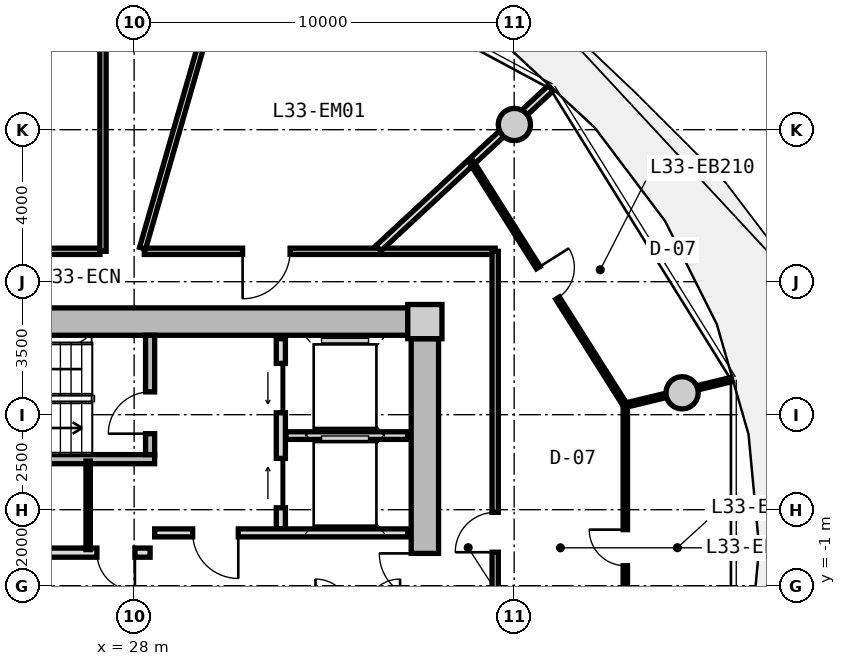
"""IFC4 building model, lengths in metres.
Left out: names, types, materials, properties, quantities, classifications, styles, units other than length and angle.
Written with IfcOpenShell. Run it as: python <this file> out.ifc"""

import sys

from ifc_helpers import new_model, si_unit, direction, frame, frame_2d, origin, origin_2d, place, context, subcontext, project, spatial, rectangle, circle, extrude, source, transform, mapped, element, fill, save


model = new_model("IFC4")
c1 = context("Model", 3, precision=1e-05, world=origin(), true_north=direction((0.0, 1.0)))
c2 = subcontext(c1, "Body", "Model", "MODEL_VIEW")
j1 = project(units=[si_unit("LENGTHUNIT", "METRE"), si_unit("PLANEANGLEUNIT", "RADIAN")], contexts=[c1])
p1 = place(None, origin())
s1 = spatial("IfcSite", under=j1, at=p1, CompositionType="ELEMENT")
p2 = place(p1, origin())
s2 = spatial("IfcBuilding", under=s1, at=p2, CompositionType="ELEMENT")
p3 = place(p2, frame((0.0, 0.0, 108.45)))
s3 = spatial("IfcBuildingStorey", under=s2, at=p3, CompositionType="ELEMENT", Elevation=108.45)
m1 = source(origin(), c2, "Body", "SweptSolid", [
    extrude(rectangle(XDim=0.9, YDim=0.9, at=origin_2d()), origin(), (0.0, 0.0, 1.0), 3.05),
])
p4 = place(p3, frame((35.65, 5.95, 0.0), z_axis=(0.0, 0.0, 1.0), x_axis=(1.0, 0.0, 0.0)))
e1 = element("IfcColumn", 1, at=p4, inside=s3, PredefinedType="COLUMN", context=c2, shape_type="MappedRepresentation", body=[
    mapped(m1, transform((0.0, 0.0, 0.0), x_axis=(1.0, 0.0, 0.0), y_axis=(0.0, 1.0, 0.0), z_axis=(0.0, 0.0, 1.0), scale=1.0)),
])
m2 = source(origin(), c2, "Body", "SweptSolid", [
    extrude(rectangle(XDim=14.4, YDim=0.72, at=frame_2d((7.2, 0.0))), origin(), (0.0, 0.0, 1.0), 2.79),
])
p5 = place(p3, frame((20.8, 5.95, 0.0), z_axis=(0.0, 0.0, 1.0), x_axis=(1.0, 0.0, 0.0)))
e2 = element("IfcWall", 2, at=p5, inside=s3, PredefinedType="SHEAR", context=c2, shape_type="MappedRepresentation", body=[
    mapped(m2, transform((0.0, 0.0, 0.0), x_axis=(1.0, 0.0, 0.0), y_axis=(0.0, 1.0, 0.0), z_axis=(0.0, 0.0, 1.0), scale=1.0)),
])
m3 = source(origin(), c2, "Body", "SweptSolid", [
    extrude(rectangle(XDim=11.0, YDim=0.72, at=frame_2d((5.5, 0.0))), origin(), (0.0, 0.0, 1.0), 2.79),
])
p6 = place(p3, frame((35.65, 5.5, 0.0), z_axis=(0.0, 0.0, 1.0), x_axis=(0.0, -1.0, 0.0)))
e3 = element("IfcWall", 3, at=p6, inside=s3, PredefinedType="SHEAR", context=c2, shape_type="MappedRepresentation", body=[
    mapped(m3, transform((0.0, 0.0, 0.0), x_axis=(1.0, 0.0, 0.0), y_axis=(0.0, 1.0, 0.0), z_axis=(0.0, 0.0, 1.0), scale=1.0)),
])
p7 = place(p6, frame((5.65, 0.0, 0.0)))
e4 = element("IfcOpeningElement", 4, at=p7, cuts=e3, PredefinedType="OPENING", context=c2, shape_type="SweptSolid", body=[
    extrude(rectangle(XDim=1.2, YDim=2.15, at=frame_2d((0.6, 1.075))), frame((0.0, 0.37, 0.0), z_axis=(0.0, -1.0, 0.0), x_axis=(1.0, 0.0, 0.0)), (0.0, 0.0, 1.0), 0.74),
])
m4 = source(origin(), c2, "Body", "SweptSolid", [
    extrude(circle(Radius=0.425, at=origin_2d()), origin(), (0.0, 0.0, 1.0), 3.05),
])
for number, where, z_axis, x_axis in (
    (5, (42.419, 4.076, 0.0), (0.0, 0.0, 1.0), (1.0, 0.0, 0.0)),
    (6, (38.006, 11.137, 0.0), (0.0, 0.0, 1.0), (1.0, 0.0, 0.0)),
):
    element("IfcColumn", number, at=place(p3, frame(where, z_axis=z_axis, x_axis=x_axis)), inside=s3, PredefinedType="COLUMN", context=c2, shape_type="MappedRepresentation", body=[
        mapped(m4, transform((0.0, 0.0, 0.0), x_axis=(1.0, 0.0, 0.0), y_axis=(0.0, 1.0, 0.0), z_axis=(0.0, 0.0, 1.0), scale=1.0)),
    ])
m5 = source(origin(), c2, "Body", "SweptSolid", [
    extrude(rectangle(XDim=7.83, YDim=0.24, at=frame_2d((3.915, 0.0))), origin(), (0.0, 0.0, 1.0), 2.79),
])
p8 = place(p3, frame((20.71, 2.33, 0.0), z_axis=(0.0, 0.0, 1.0), x_axis=(1.0, 0.0, 0.0)))
e7 = element("IfcWall", 7, at=p8, inside=s3, PredefinedType="PARTITIONING", context=c2, shape_type="MappedRepresentation", body=[
    mapped(m5, transform((0.0, 0.0, 0.0), x_axis=(1.0, 0.0, 0.0), y_axis=(0.0, 1.0, 0.0), z_axis=(0.0, 0.0, 1.0), scale=1.0)),
])
m6 = source(origin(), c2, "Body", "SweptSolid", [
    extrude(rectangle(XDim=3.14, YDim=0.24, at=frame_2d((1.57, 0.0))), origin(), (0.0, 0.0, 1.0), 2.79),
])
p9 = place(p3, frame((28.42, 2.45, 0.0), z_axis=(0.0, 0.0, 1.0), x_axis=(0.0, 1.0, 0.0)))
e8 = element("IfcWall", 8, at=p9, inside=s3, PredefinedType="PARTITIONING", context=c2, shape_type="MappedRepresentation", body=[
    mapped(m6, transform((0.0, 0.0, 0.0), x_axis=(1.0, 0.0, 0.0), y_axis=(0.0, 1.0, 0.0), z_axis=(0.0, 0.0, 1.0), scale=1.0)),
])
p10 = place(p9, frame((0.55, 0.0, 0.0)))
e9 = element("IfcOpeningElement", 9, at=p10, cuts=e8, PredefinedType="OPENING", context=c2, shape_type="SweptSolid", body=[
    extrude(rectangle(XDim=1.1, YDim=2.15, at=frame_2d((0.55, 1.075))), frame((0.0, 0.13, 0.0), z_axis=(0.0, -1.0, 0.0), x_axis=(1.0, 0.0, 0.0)), (0.0, 0.0, 1.0), 0.26),
])
m7 = source(origin(), c2, "Body", "SweptSolid", [
    extrude(rectangle(XDim=5.0, YDim=0.24, at=frame_2d((2.5, 0.0))), origin(), (0.0, 0.0, 1.0), 2.775),
])
p11 = place(p3, frame((31.86, 0.5, 0.0), z_axis=(0.0, 0.0, 1.0), x_axis=(0.0, 1.0, 0.0)))
e10 = element("IfcWall", 10, at=p11, inside=s3, PredefinedType="PARTITIONING", context=c2, shape_type="MappedRepresentation", body=[
    mapped(m7, transform((0.0, 0.0, 0.0), x_axis=(1.0, 0.0, 0.0), y_axis=(0.0, 1.0, 0.0), z_axis=(0.0, 0.0, 1.0), scale=1.0)),
])
p12 = place(p11, frame((3.05, 0.0, 0.0)))
e11 = element("IfcOpeningElement", 11, at=p12, cuts=e10, PredefinedType="OPENING", context=c2, shape_type="SweptSolid", body=[
    extrude(rectangle(XDim=1.3, YDim=2.2, at=frame_2d((0.65, 1.1))), frame((0.0, 0.13, 0.0), z_axis=(0.0, -1.0, 0.0), x_axis=(1.0, 0.0, 0.0)), (0.0, 0.0, 1.0), 0.26),
])
p13 = place(p11, frame((0.55, 0.0, 0.0)))
e12 = element("IfcOpeningElement", 12, at=p13, cuts=e10, PredefinedType="OPENING", context=c2, shape_type="SweptSolid", body=[
    extrude(rectangle(XDim=1.3, YDim=2.2, at=frame_2d((0.65, 1.1))), frame((0.0, 0.13, 0.0), z_axis=(0.0, -1.0, 0.0), x_axis=(1.0, 0.0, 0.0)), (0.0, 0.0, 1.0), 0.26),
])
m8 = source(origin(), c2, "Body", "SweptSolid", [
    extrude(rectangle(XDim=3.2, YDim=0.2, at=frame_2d((1.6, 0.0))), origin(), (0.0, 0.0, 1.0), 2.775),
])
p14 = place(p3, frame((32.0, 2.95, 0.0), z_axis=(0.0, 0.0, 1.0), x_axis=(1.0, 0.0, 0.0)))
e13 = element("IfcWall", 13, at=p14, inside=s3, PredefinedType="PARTITIONING", context=c2, shape_type="MappedRepresentation", body=[
    mapped(m8, transform((0.0, 0.0, 0.0), x_axis=(1.0, 0.0, 0.0), y_axis=(0.0, 1.0, 0.0), z_axis=(0.0, 0.0, 1.0), scale=1.0)),
])
m9 = source(origin(), c2, "Body", "SweptSolid", [
    extrude(rectangle(XDim=6.66, YDim=0.21, at=frame_2d((3.33, 0.0))), origin(), (0.0, 0.0, 1.0), 2.775),
])
p15 = place(p3, frame((28.54, 0.39, 0.0), z_axis=(0.0, 0.0, 1.0), x_axis=(1.0, 0.0, 0.0)))
e14 = element("IfcWall", 14, at=p15, inside=s3, PredefinedType="PARTITIONING", context=c2, shape_type="MappedRepresentation", body=[
    mapped(m9, transform((0.0, 0.0, 0.0), x_axis=(1.0, 0.0, 0.0), y_axis=(0.0, 1.0, 0.0), z_axis=(0.0, 0.0, 1.0), scale=1.0)),
])
p16 = place(p15, frame((1.0, 0.0, 0.0)))
e15 = element("IfcOpeningElement", 15, at=p16, cuts=e14, PredefinedType="OPENING", context=c2, shape_type="SweptSolid", body=[
    extrude(rectangle(XDim=1.2, YDim=2.15, at=frame_2d((0.6, 1.075))), frame((0.0, 0.115, 0.0), z_axis=(0.0, -1.0, 0.0), x_axis=(1.0, 0.0, 0.0)), (0.0, 0.0, 1.0), 0.23),
])
m10 = source(origin(), c2, "Body", "SweptSolid", [
    extrude(rectangle(XDim=7.62, YDim=0.24, at=frame_2d((3.81, 0.0))), origin(), (0.0, 0.0, 1.0), 2.775),
])
p17 = place(p3, frame((20.8, -0.13, 0.0), z_axis=(0.0, 0.0, 1.0), x_axis=(1.0, 0.0, 0.0)))
e16 = element("IfcWall", 16, at=p17, inside=s3, PredefinedType="PARTITIONING", context=c2, shape_type="MappedRepresentation", body=[
    mapped(m10, transform((0.0, 0.0, 0.0), x_axis=(1.0, 0.0, 0.0), y_axis=(0.0, 1.0, 0.0), z_axis=(0.0, 0.0, 1.0), scale=1.0)),
])
p18 = place(p17, frame((6.22, 0.0, 0.0)))
e17 = element("IfcOpeningElement", 17, at=p18, cuts=e16, PredefinedType="OPENING", context=c2, shape_type="SweptSolid", body=[
    extrude(rectangle(XDim=1.0, YDim=2.1, at=frame_2d((0.5, 1.05))), frame((0.0, 0.13, 0.0), z_axis=(0.0, -1.0, 0.0), x_axis=(1.0, 0.0, 0.0)), (0.0, 0.0, 1.0), 0.26),
])
p19 = place(p17, frame((2.4, 0.0, 0.0)))
e18 = element("IfcOpeningElement", 18, at=p19, cuts=e16, PredefinedType="OPENING", context=c2, shape_type="SweptSolid", body=[
    extrude(rectangle(XDim=1.0, YDim=2.1, at=frame_2d((0.5, 1.05))), frame((0.0, 0.13, 0.0), z_axis=(0.0, -1.0, 0.0), x_axis=(1.0, 0.0, 0.0)), (0.0, 0.0, 1.0), 0.26),
])
m11 = source(origin(), c2, "Body", "SweptSolid", [
    extrude(rectangle(XDim=2.33, YDim=0.115, at=frame_2d((1.165, 0.0))), origin(), (0.0, 0.0, 1.0), 2.775),
])
p20 = place(p3, frame((26.79, -0.05, 0.0), z_axis=(0.0, 0.0, 1.0), x_axis=(0.0, 1.0, 0.0)))
e19 = element("IfcWall", 19, at=p20, inside=s3, PredefinedType="PARTITIONING", context=c2, shape_type="MappedRepresentation", body=[
    mapped(m11, transform((0.0, 0.0, 0.0), x_axis=(1.0, 0.0, 0.0), y_axis=(0.0, 1.0, 0.0), z_axis=(0.0, 0.0, 1.0), scale=1.0)),
])
m12 = source(origin(), c2, "Body", "SweptSolid", [
    extrude(rectangle(XDim=8.6, YDim=0.165, at=frame_2d((4.3, 0.0))), origin(), (0.0, 0.0, 1.0), 2.775),
])
p21 = place(p3, frame((18.5, 7.8, 0.0), z_axis=(0.0, 0.0, 1.0), x_axis=(1.0, 0.0, 0.0)))
e20 = element("IfcWall", 20, at=p21, inside=s3, PredefinedType="PARTITIONING", context=c2, shape_type="MappedRepresentation", body=[
    mapped(m12, transform((0.0, 0.0, 0.0), x_axis=(1.0, 0.0, 0.0), y_axis=(0.0, 1.0, 0.0), z_axis=(0.0, 0.0, 1.0), scale=1.0)),
])
p22 = place(p21, frame((3.775, 0.0, 0.0)))
e21 = element("IfcOpeningElement", 21, at=p22, cuts=e20, PredefinedType="OPENING", context=c2, shape_type="SweptSolid", body=[
    extrude(rectangle(XDim=1.05, YDim=2.15, at=frame_2d((0.525, 1.075))), frame((0.0, 0.093, 0.0), z_axis=(0.0, -1.0, 0.0), x_axis=(1.0, 0.0, 0.0)), (0.0, 0.0, 1.0), 0.185),
])
m13 = source(origin(), c2, "Body", "SweptSolid", [
    extrude(rectangle(XDim=9.234, YDim=0.165, at=frame_2d((4.617, 0.0))), origin(), (0.0, 0.0, 1.0), 2.775),
])
p23 = place(p3, frame((28.266, 7.8, 0.0), z_axis=(0.0, 0.0, 1.0), x_axis=(1.0, 0.0, 0.0)))
e22 = element("IfcWall", 22, at=p23, inside=s3, PredefinedType="PARTITIONING", context=c2, shape_type="MappedRepresentation", body=[
    mapped(m13, transform((0.0, 0.0, 0.0), x_axis=(1.0, 0.0, 0.0), y_axis=(0.0, 1.0, 0.0), z_axis=(0.0, 0.0, 1.0), scale=1.0)),
])
p24 = place(p23, frame((2.588, 0.0, 0.0)))
e23 = element("IfcOpeningElement", 23, at=p24, cuts=e22, PredefinedType="OPENING", context=c2, shape_type="SweptSolid", body=[
    extrude(rectangle(XDim=1.25, YDim=2.2, at=frame_2d((0.625, 1.1))), frame((0.0, 0.093, 0.0), z_axis=(0.0, -1.0, 0.0), x_axis=(1.0, 0.0, 0.0)), (0.0, 0.0, 1.0), 0.185),
])
m14 = source(origin(), c2, "Body", "SweptSolid", [
    extrude(rectangle(XDim=15.6, YDim=0.165, at=frame_2d((7.8, 0.0))), origin(), (0.0, 0.0, 1.0), 2.775),
])
p25 = place(p3, frame((37.5, 7.8, 0.0), z_axis=(0.0, 0.0, 1.0), x_axis=(0.0, -1.0, 0.0)))
e24 = element("IfcWall", 24, at=p25, inside=s3, PredefinedType="PARTITIONING", context=c2, shape_type="MappedRepresentation", body=[
    mapped(m14, transform((0.0, 0.0, 0.0), x_axis=(1.0, 0.0, 0.0), y_axis=(0.0, 1.0, 0.0), z_axis=(0.0, 0.0, 1.0), scale=1.0)),
])
p26 = place(p25, frame((6.87, 0.0, 0.0)))
e25 = element("IfcOpeningElement", 25, at=p26, cuts=e24, PredefinedType="OPENING", context=c2, shape_type="SweptSolid", body=[
    extrude(rectangle(XDim=1.05, YDim=2.15, at=frame_2d((0.525, 1.075))), frame((0.0, 0.093, 0.0), z_axis=(0.0, -1.0, 0.0), x_axis=(1.0, 0.0, 0.0)), (0.0, 0.0, 1.0), 0.185),
])
m15 = source(origin(), c2, "Body", "SweptSolid", [
    extrude(rectangle(XDim=8.989, YDim=0.165, at=frame_2d((4.495, 0.0))), origin(), (0.0, 0.0, 1.0), 2.275),
])
p27 = place(p3, frame((28.222, 7.88, 0.0), z_axis=(0.0, 0.0, 1.0), x_axis=(0.27702323008, 0.960863221274, 0.0)))
e26 = element("IfcWall", 26, at=p27, inside=s3, PredefinedType="PARTITIONING", context=c2, shape_type="MappedRepresentation", body=[
    mapped(m15, transform((0.0, 0.0, 0.0), x_axis=(1.0, 0.0, 0.0), y_axis=(0.0, 1.0, 0.0), z_axis=(0.0, 0.0, 1.0), scale=1.0)),
])
m16 = source(origin(), c2, "Body", "SweptSolid", [
    extrude(rectangle(XDim=7.56, YDim=0.165, at=frame_2d((3.78, 0.0))), origin(), (0.0, 0.0, 1.0), 2.775),
])
p28 = place(p3, frame((27.18, 7.8, 0.0), z_axis=(0.0, 0.0, 1.0), x_axis=(0.0, 1.0, 0.0)))
e27 = element("IfcWall", 27, at=p28, inside=s3, PredefinedType="PARTITIONING", context=c2, shape_type="MappedRepresentation", body=[
    mapped(m16, transform((0.0, 0.0, 0.0), x_axis=(1.0, 0.0, 0.0), y_axis=(0.0, 1.0, 0.0), z_axis=(0.0, 0.0, 1.0), scale=1.0)),
])
m17 = source(origin(), c2, "Body", "SweptSolid", [
    extrude(rectangle(XDim=6.187, YDim=0.19, at=frame_2d((3.093, 0.0))), origin(), (0.0, 0.0, 1.0), 2.275),
])
p29 = place(p3, frame((34.429, 7.88, 0.0), z_axis=(0.0, 0.0, 1.0), x_axis=(0.732501077882, 0.680765870841, 0.0)))
e28 = element("IfcWall", 28, at=p29, inside=s3, PredefinedType="PARTITIONING", context=c2, shape_type="MappedRepresentation", body=[
    mapped(m17, transform((0.0, 0.0, 0.0), x_axis=(1.0, 0.0, 0.0), y_axis=(0.0, 1.0, 0.0), z_axis=(0.0, 0.0, 1.0), scale=1.0)),
])
m18 = source(origin(), c2, "Body", "SweptSolid", [
    extrude(rectangle(XDim=7.499, YDim=0.115, at=frame_2d((3.75, 0.0))), origin(), (0.0, 0.0, 1.0), 2.775),
])
p30 = place(p3, frame((40.925, -3.75, 0.0), z_axis=(0.0, 0.0, 1.0), x_axis=(0.0, 1.0, 0.0)))
e29 = element("IfcWall", 29, at=p30, inside=s3, PredefinedType="PARTITIONING", context=c2, shape_type="MappedRepresentation", body=[
    mapped(m18, transform((0.0, 0.0, 0.0), x_axis=(1.0, 0.0, 0.0), y_axis=(0.0, 1.0, 0.0), z_axis=(0.0, 0.0, 1.0), scale=1.0)),
])
p31 = place(p30, frame((3.275, 0.0, 0.0)))
e30 = element("IfcOpeningElement", 30, at=p31, cuts=e29, PredefinedType="OPENING", context=c2, shape_type="SweptSolid", body=[
    extrude(rectangle(XDim=0.95, YDim=2.1, at=frame_2d((0.475, 1.05))), frame((0.0, 0.067, 0.0), z_axis=(0.0, -1.0, 0.0), x_axis=(1.0, 0.0, 0.0)), (0.0, 0.0, 1.0), 0.135),
])
m19 = source(origin(), c2, "Body", "SweptSolid", [
    extrude(rectangle(XDim=7.618, YDim=0.115, at=frame_2d((3.809, 0.0))), origin(), (0.0, 0.0, 1.0), 2.775),
])
p32 = place(p3, frame((40.923, 3.749, 0.0), z_axis=(0.0, 0.0, 1.0), x_axis=(-0.534316104929, 0.845284744931, 0.0)))
e31 = element("IfcWall", 31, at=p32, inside=s3, PredefinedType="PARTITIONING", context=c2, shape_type="MappedRepresentation", body=[
    mapped(m19, transform((0.0, 0.0, 0.0), x_axis=(1.0, 0.0, 0.0), y_axis=(0.0, 1.0, 0.0), z_axis=(0.0, 0.0, 1.0), scale=1.0)),
])
p33 = place(p32, frame((3.334, 0.0, 0.0)))
e32 = element("IfcOpeningElement", 32, at=p33, cuts=e31, PredefinedType="OPENING", context=c2, shape_type="SweptSolid", body=[
    extrude(rectangle(XDim=0.95, YDim=2.1, at=frame_2d((0.475, 1.05))), frame((0.0, 0.067, 0.0), z_axis=(0.0, -1.0, 0.0), x_axis=(1.0, 0.0, 0.0)), (0.0, 0.0, 1.0), 0.135),
])
m20 = source(origin(), c2, "Body", "SweptSolid", [
    extrude(rectangle(XDim=2.881, YDim=0.115, at=frame_2d((1.44, 0.0))), origin(), (0.0, 0.0, 1.0), 2.275),
])
p34 = place(p3, frame((40.923, 3.749, 0.0), z_axis=(0.0, 0.0, 1.0), x_axis=(0.972031524605, 0.234850410208, 0.0)))
e33 = element("IfcWall", 33, at=p34, inside=s3, PredefinedType="PARTITIONING", context=c2, shape_type="MappedRepresentation", body=[
    mapped(m20, transform((0.0, 0.0, 0.0), x_axis=(1.0, 0.0, 0.0), y_axis=(0.0, 1.0, 0.0), z_axis=(0.0, 0.0, 1.0), scale=1.0)),
])
m21 = source(origin(), c2, "Body", "SweptSolid", [
    extrude(rectangle(XDim=1.1, YDim=2.15, at=frame_2d((0.55, 1.075))), frame((0.0, 0.025, 0.0), z_axis=(0.0, -1.0, 0.0), x_axis=(1.0, 0.0, 0.0)), (0.0, 0.0, 1.0), 0.05),
])
p35 = place(p10, origin())
e34 = element("IfcDoor", 34, at=p35, inside=s3, OperationType="SINGLE_SWING_LEFT", PredefinedType="DOOR", context=c2, shape_type="MappedRepresentation", body=[
    mapped(m21, transform((0.0, 0.0, 0.0), x_axis=(1.0, 0.0, 0.0), y_axis=(0.0, 1.0, 0.0), z_axis=(0.0, 0.0, 1.0), scale=1.0)),
])
fill(e9, e34)
m22 = source(origin(), c2, "Body", "SweptSolid", [
    extrude(rectangle(XDim=1.3, YDim=2.2, at=frame_2d((0.65, 1.1))), frame((0.0, 0.025, 0.0), z_axis=(0.0, -1.0, 0.0), x_axis=(1.0, 0.0, 0.0)), (0.0, 0.0, 1.0), 0.05),
])
p36 = place(p12, origin())
e35 = element("IfcDoor", 35, at=p36, inside=s3, OperationType="SLIDING_TO_LEFT", PredefinedType="DOOR", context=c2, shape_type="MappedRepresentation", body=[
    mapped(m22, transform((0.0, 0.0, 0.0), x_axis=(1.0, 0.0, 0.0), y_axis=(0.0, 1.0, 0.0), z_axis=(0.0, 0.0, 1.0), scale=1.0)),
])
fill(e11, e35)
p37 = place(p13, origin())
e36 = element("IfcDoor", 36, at=p37, inside=s3, OperationType="SLIDING_TO_RIGHT", PredefinedType="DOOR", context=c2, shape_type="MappedRepresentation", body=[
    mapped(m22, transform((0.0, 0.0, 0.0), x_axis=(1.0, 0.0, 0.0), y_axis=(0.0, 1.0, 0.0), z_axis=(0.0, 0.0, 1.0), scale=1.0)),
])
fill(e12, e36)
m23 = source(origin(), c2, "Body", "SweptSolid", [
    extrude(rectangle(XDim=1.2, YDim=2.15, at=frame_2d((0.6, 1.075))), frame((0.0, 0.025, 0.0), z_axis=(0.0, -1.0, 0.0), x_axis=(1.0, 0.0, 0.0)), (0.0, 0.0, 1.0), 0.05),
])
p38 = place(p16, frame((1.2, 0.0, 0.0), z_axis=(0.0, 0.0, 1.0), x_axis=(-1.0, 0.0, 0.0)))
e37 = element("IfcDoor", 37, at=p38, inside=s3, OperationType="SINGLE_SWING_LEFT", PredefinedType="DOOR", context=c2, shape_type="MappedRepresentation", body=[
    mapped(m23, transform((0.0, 0.0, 0.0), x_axis=(1.0, 0.0, 0.0), y_axis=(0.0, 1.0, 0.0), z_axis=(0.0, 0.0, 1.0), scale=1.0)),
])
fill(e15, e37)
p39 = place(p7, frame((1.2, 0.0, 0.0), z_axis=(0.0, 0.0, 1.0), x_axis=(-1.0, 0.0, 0.0)))
e38 = element("IfcDoor", 38, at=p39, inside=s3, OperationType="SINGLE_SWING_RIGHT", PredefinedType="DOOR", context=c2, shape_type="MappedRepresentation", body=[
    mapped(m23, transform((0.0, 0.0, 0.0), x_axis=(1.0, 0.0, 0.0), y_axis=(0.0, 1.0, 0.0), z_axis=(0.0, 0.0, 1.0), scale=1.0)),
])
fill(e4, e38)
m24 = source(origin(), c2, "Body", "SweptSolid", [
    extrude(rectangle(XDim=1.0, YDim=2.1, at=frame_2d((0.5, 1.05))), frame((0.0, 0.025, 0.0), z_axis=(0.0, -1.0, 0.0), x_axis=(1.0, 0.0, 0.0)), (0.0, 0.0, 1.0), 0.05),
])
p40 = place(p18, frame((1.0, 0.0, 0.0), z_axis=(0.0, 0.0, 1.0), x_axis=(-1.0, 0.0, 0.0)))
e39 = element("IfcDoor", 39, at=p40, inside=s3, OperationType="SINGLE_SWING_LEFT", PredefinedType="DOOR", context=c2, shape_type="MappedRepresentation", body=[
    mapped(m24, transform((0.0, 0.0, 0.0), x_axis=(1.0, 0.0, 0.0), y_axis=(0.0, 1.0, 0.0), z_axis=(0.0, 0.0, 1.0), scale=1.0)),
])
fill(e17, e39)
m25 = source(origin(), c2, "Body", "SweptSolid", [
    extrude(rectangle(XDim=1.05, YDim=2.15, at=frame_2d((0.525, 1.075))), frame((0.0, 0.025, 0.0), z_axis=(0.0, -1.0, 0.0), x_axis=(1.0, 0.0, 0.0)), (0.0, 0.0, 1.0), 0.05),
])
p41 = place(p26, frame((1.05, 0.0, 0.0), z_axis=(0.0, 0.0, 1.0), x_axis=(-1.0, 0.0, 0.0)))
e40 = element("IfcDoor", 40, at=p41, inside=s3, OperationType="SINGLE_SWING_LEFT", PredefinedType="DOOR", context=c2, shape_type="MappedRepresentation", body=[
    mapped(m25, transform((0.0, 0.0, 0.0), x_axis=(1.0, 0.0, 0.0), y_axis=(0.0, 1.0, 0.0), z_axis=(0.0, 0.0, 1.0), scale=1.0)),
])
fill(e25, e40)
m26 = source(origin(), c2, "Body", "SweptSolid", [
    extrude(rectangle(XDim=0.95, YDim=2.1, at=frame_2d((0.475, 1.05))), frame((0.0, 0.025, 0.0), z_axis=(0.0, -1.0, 0.0), x_axis=(1.0, 0.0, 0.0)), (0.0, 0.0, 1.0), 0.05),
])
p42 = place(p31, origin())
e41 = element("IfcDoor", 41, at=p42, inside=s3, OperationType="SINGLE_SWING_RIGHT", PredefinedType="DOOR", context=c2, shape_type="MappedRepresentation", body=[
    mapped(m26, transform((0.0, 0.0, 0.0), x_axis=(1.0, 0.0, 0.0), y_axis=(0.0, 1.0, 0.0), z_axis=(0.0, 0.0, 1.0), scale=1.0)),
])
fill(e30, e41)
p43 = place(p33, frame((0.95, 0.0, 0.0), z_axis=(0.0, 0.0, 1.0), x_axis=(-1.0, 0.0, 0.0)))
e42 = element("IfcDoor", 42, at=p43, inside=s3, OperationType="SINGLE_SWING_LEFT", PredefinedType="DOOR", context=c2, shape_type="MappedRepresentation", body=[
    mapped(m26, transform((0.0, 0.0, 0.0), x_axis=(1.0, 0.0, 0.0), y_axis=(0.0, 1.0, 0.0), z_axis=(0.0, 0.0, 1.0), scale=1.0)),
])
fill(e32, e42)
m27 = source(origin(), c2, "Body", "SweptSolid", [
    extrude(rectangle(XDim=1.25, YDim=2.2, at=frame_2d((0.625, 1.1))), frame((0.0, 0.025, 0.0), z_axis=(0.0, -1.0, 0.0), x_axis=(1.0, 0.0, 0.0)), (0.0, 0.0, 1.0), 0.05),
])
p44 = place(p24, frame((1.25, 0.0, 0.0), z_axis=(0.0, 0.0, 1.0), x_axis=(-1.0, 0.0, 0.0)))
e43 = element("IfcDoor", 43, at=p44, inside=s3, OperationType="SINGLE_SWING_RIGHT", PredefinedType="DOOR", context=c2, shape_type="MappedRepresentation", body=[
    mapped(m27, transform((0.0, 0.0, 0.0), x_axis=(1.0, 0.0, 0.0), y_axis=(0.0, 1.0, 0.0), z_axis=(0.0, 0.0, 1.0), scale=1.0)),
])
fill(e23, e43)
save(model, sys.argv[1])
